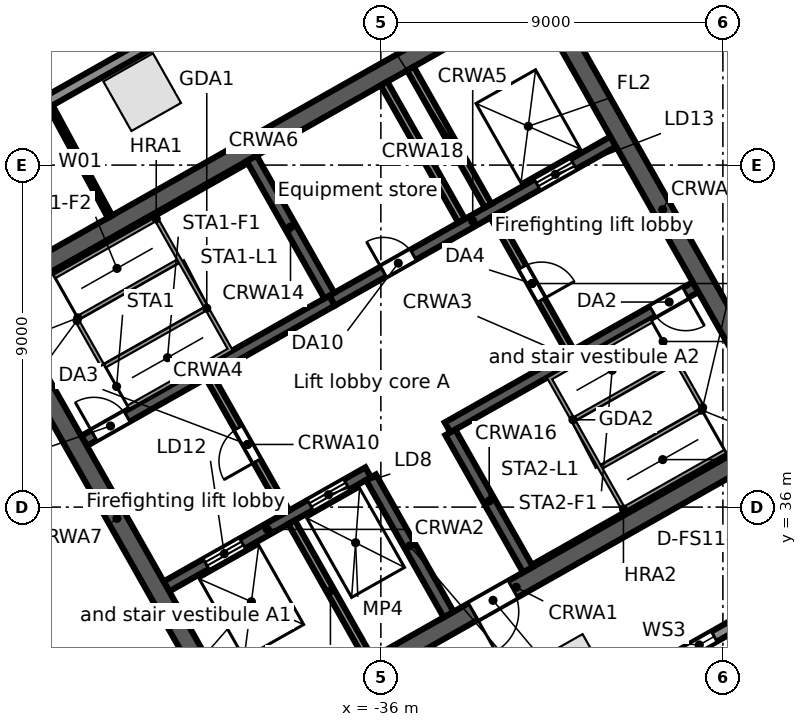
"""IFC4 building model, lengths in metres.
Left out: names, types, materials, properties, quantities, classifications, styles, units other than length and angle.
Written with IfcOpenShell. Run it as: python <this file> out.ifc"""

import sys

from ifc_helpers import new_model, si_unit, direction, frame, frame_2d, origin, origin_2d, place, context, subcontext, project, spatial, rectangle, extrude, element, fill, save


model = new_model("IFC4")
c1 = context("Model", 3, precision=1e-05, world=origin(), true_north=direction((0.0, 1.0)))
c2 = subcontext(c1, "Body", "Model", "MODEL_VIEW")
j1 = project(units=[si_unit("LENGTHUNIT", "METRE"), si_unit("PLANEANGLEUNIT", "RADIAN")], contexts=[c1])
p1 = place(None, origin())
s1 = spatial("IfcSite", under=j1, at=p1, CompositionType="ELEMENT")
p2 = place(p1, origin())
s2 = spatial("IfcBuilding", under=s1, at=p2, CompositionType="ELEMENT")
p3 = place(p2, frame((0.0, 0.0, 166.9)))
s3 = spatial("IfcBuildingStorey", under=s2, at=p3, CompositionType="ELEMENT", Elevation=166.9)
for number, where, z_axis, x_axis in (
    (1, (-42.28, 46.919, 0.0), (0.0, 0.0, 1.0), (-0.87, -0.492, 0.0)),
    (2, (-30.976, 31.635, 0.0), (0.0, 0.0, 1.0), (0.87, 0.492, 0.0)),
):
    element("IfcColumn", number, at=place(p3, frame(where, z_axis=z_axis, x_axis=x_axis)), inside=s3, PredefinedType="COLUMN", context=c2, shape_type="SweptSolid", body=[
        extrude(rectangle(XDim=1.5, YDim=1.5, at=origin_2d()), origin(), (0.0, 0.0, 1.0), 4.0),
    ])
p4 = place(p3, frame((-0.055, 47.969, 0.0), z_axis=(0.0, 0.0, 1.0), x_axis=(-0.870355730478, -0.492423499058, 0.0)))
e3 = element("IfcWall", 3, at=p4, inside=s3, PredefinedType="STANDARD", context=c2, shape_type="SweptSolid", body=[
    extrude(rectangle(XDim=43.75, YDim=0.3, at=frame_2d((21.875, 0.0))), origin(), (0.0, 0.0, 1.0), 3.68),
])
p5 = place(p4, frame((39.977, 0.0, 0.6)))
e4 = element("IfcOpeningElement", 4, at=p5, cuts=e3, PredefinedType="OPENING", context=c2, shape_type="SweptSolid", body=[
    extrude(rectangle(XDim=0.9, YDim=2.4, at=frame_2d((0.45, 1.2))), frame((0.0, 0.16, 0.0), z_axis=(0.0, -1.0, 0.0), x_axis=(1.0, 0.0, 0.0)), (0.0, 0.0, 1.0), 0.32),
])
p6 = place(p4, frame((37.338, 0.0, 0.0)))
e5 = element("IfcOpeningElement", 5, at=p6, cuts=e3, PredefinedType="OPENING", context=c2, shape_type="SweptSolid", body=[
    extrude(rectangle(XDim=1.8, YDim=2.4, at=frame_2d((0.9, 1.2))), frame((0.0, 0.16, 0.0), z_axis=(0.0, -1.0, 0.0), x_axis=(1.0, 0.0, 0.0)), (0.0, 0.0, 1.0), 0.32),
])
p7 = place(p4, frame((31.222, 0.0, 0.6)))
e6 = element("IfcOpeningElement", 6, at=p7, cuts=e3, PredefinedType="OPENING", context=c2, shape_type="SweptSolid", body=[
    extrude(rectangle(XDim=0.9, YDim=2.4, at=frame_2d((0.45, 1.2))), frame((0.0, 0.16, 0.0), z_axis=(0.0, -1.0, 0.0), x_axis=(1.0, 0.0, 0.0)), (0.0, 0.0, 1.0), 0.32),
])
p8 = place(p4, frame((28.584, 0.0, 0.0)))
e7 = element("IfcOpeningElement", 7, at=p8, cuts=e3, PredefinedType="OPENING", context=c2, shape_type="SweptSolid", body=[
    extrude(rectangle(XDim=1.8, YDim=2.4, at=frame_2d((0.9, 1.2))), frame((0.0, 0.16, 0.0), z_axis=(0.0, -1.0, 0.0), x_axis=(1.0, 0.0, 0.0)), (0.0, 0.0, 1.0), 0.32),
])
p9 = place(p4, frame((22.468, 0.0, 0.6)))
e8 = element("IfcOpeningElement", 8, at=p9, cuts=e3, PredefinedType="OPENING", context=c2, shape_type="SweptSolid", body=[
    extrude(rectangle(XDim=0.9, YDim=2.4, at=frame_2d((0.45, 1.2))), frame((0.0, 0.16, 0.0), z_axis=(0.0, -1.0, 0.0), x_axis=(1.0, 0.0, 0.0)), (0.0, 0.0, 1.0), 0.32),
])
p10 = place(p4, frame((19.829, 0.0, 0.0)))
e9 = element("IfcOpeningElement", 9, at=p10, cuts=e3, PredefinedType="OPENING", context=c2, shape_type="SweptSolid", body=[
    extrude(rectangle(XDim=1.8, YDim=2.4, at=frame_2d((0.9, 1.2))), frame((0.0, 0.16, 0.0), z_axis=(0.0, -1.0, 0.0), x_axis=(1.0, 0.0, 0.0)), (0.0, 0.0, 1.0), 0.32),
])
p11 = place(p4, frame((13.713, 0.0, 0.6)))
e10 = element("IfcOpeningElement", 10, at=p11, cuts=e3, PredefinedType="OPENING", context=c2, shape_type="SweptSolid", body=[
    extrude(rectangle(XDim=0.9, YDim=2.4, at=frame_2d((0.45, 1.2))), frame((0.0, 0.16, 0.0), z_axis=(0.0, -1.0, 0.0), x_axis=(1.0, 0.0, 0.0)), (0.0, 0.0, 1.0), 0.32),
])
p12 = place(p4, frame((11.075, 0.0, 0.0)))
e11 = element("IfcOpeningElement", 11, at=p12, cuts=e3, PredefinedType="OPENING", context=c2, shape_type="SweptSolid", body=[
    extrude(rectangle(XDim=1.8, YDim=2.4, at=frame_2d((0.9, 1.2))), frame((0.0, 0.16, 0.0), z_axis=(0.0, -1.0, 0.0), x_axis=(1.0, 0.0, 0.0)), (0.0, 0.0, 1.0), 0.32),
])
p13 = place(p4, frame((4.959, 0.0, 0.6)))
e12 = element("IfcOpeningElement", 12, at=p13, cuts=e3, PredefinedType="OPENING", context=c2, shape_type="SweptSolid", body=[
    extrude(rectangle(XDim=0.9, YDim=2.4, at=frame_2d((0.45, 1.2))), frame((0.0, 0.16, 0.0), z_axis=(0.0, -1.0, 0.0), x_axis=(1.0, 0.0, 0.0)), (0.0, 0.0, 1.0), 0.32),
])
p14 = place(p4, frame((2.32, 0.0, 0.0)))
e13 = element("IfcOpeningElement", 13, at=p14, cuts=e3, PredefinedType="OPENING", context=c2, shape_type="SweptSolid", body=[
    extrude(rectangle(XDim=1.8, YDim=2.4, at=frame_2d((0.9, 1.2))), frame((0.0, 0.16, 0.0), z_axis=(0.0, -1.0, 0.0), x_axis=(1.0, 0.0, 0.0)), (0.0, 0.0, 1.0), 0.32),
])
p15 = place(p3, frame((-58.745, 38.764, 0.0), z_axis=(0.0, 0.0, 1.0), x_axis=(0.870355811726, 0.492423355453, 0.0)))
e14 = element("IfcWall", 14, at=p15, inside=s3, PredefinedType="STANDARD", context=c2, shape_type="SweptSolid", body=[
    extrude(rectangle(XDim=64.025, YDim=0.3, at=frame_2d((32.013, 0.0))), origin(), (0.0, 0.0, 1.0), 3.68),
])
p16 = place(p15, frame((60.122, 0.0, 0.6)))
e15 = element("IfcOpeningElement", 15, at=p16, cuts=e14, PredefinedType="OPENING", context=c2, shape_type="SweptSolid", body=[
    extrude(rectangle(XDim=0.9, YDim=2.4, at=frame_2d((0.45, 1.2))), frame((0.0, 0.16, 0.0), z_axis=(0.0, -1.0, 0.0), x_axis=(1.0, 0.0, 0.0)), (0.0, 0.0, 1.0), 0.32),
])
p17 = place(p15, frame((50.992, 0.0, 0.6)))
e16 = element("IfcOpeningElement", 16, at=p17, cuts=e14, PredefinedType="OPENING", context=c2, shape_type="SweptSolid", body=[
    extrude(rectangle(XDim=0.9, YDim=2.4, at=frame_2d((0.45, 1.2))), frame((0.0, 0.16, 0.0), z_axis=(0.0, -1.0, 0.0), x_axis=(1.0, 0.0, 0.0)), (0.0, 0.0, 1.0), 0.32),
])
p18 = place(p15, frame((41.862, 0.0, 0.6)))
e17 = element("IfcOpeningElement", 17, at=p18, cuts=e14, PredefinedType="OPENING", context=c2, shape_type="SweptSolid", body=[
    extrude(rectangle(XDim=0.9, YDim=2.4, at=frame_2d((0.45, 1.2))), frame((0.0, 0.16, 0.0), z_axis=(0.0, -1.0, 0.0), x_axis=(1.0, 0.0, 0.0)), (0.0, 0.0, 1.0), 0.32),
])
p19 = place(p15, frame((32.732, 0.0, 0.6)))
e18 = element("IfcOpeningElement", 18, at=p19, cuts=e14, PredefinedType="OPENING", context=c2, shape_type="SweptSolid", body=[
    extrude(rectangle(XDim=0.9, YDim=2.4, at=frame_2d((0.45, 1.2))), frame((0.0, 0.16, 0.0), z_axis=(0.0, -1.0, 0.0), x_axis=(1.0, 0.0, 0.0)), (0.0, 0.0, 1.0), 0.32),
])
p20 = place(p15, frame((23.602, 0.0, 0.6)))
e19 = element("IfcOpeningElement", 19, at=p20, cuts=e14, PredefinedType="OPENING", context=c2, shape_type="SweptSolid", body=[
    extrude(rectangle(XDim=0.9, YDim=2.4, at=frame_2d((0.45, 1.2))), frame((0.0, 0.16, 0.0), z_axis=(0.0, -1.0, 0.0), x_axis=(1.0, 0.0, 0.0)), (0.0, 0.0, 1.0), 0.32),
])
p21 = place(p15, frame((14.472, 0.0, 0.6)))
e20 = element("IfcOpeningElement", 20, at=p21, cuts=e14, PredefinedType="OPENING", context=c2, shape_type="SweptSolid", body=[
    extrude(rectangle(XDim=0.9, YDim=2.4, at=frame_2d((0.45, 1.2))), frame((0.0, 0.16, 0.0), z_axis=(0.0, -1.0, 0.0), x_axis=(1.0, 0.0, 0.0)), (0.0, 0.0, 1.0), 0.32),
])
p22 = place(p15, frame((5.342, 0.0, 0.6)))
e21 = element("IfcOpeningElement", 21, at=p22, cuts=e14, PredefinedType="OPENING", context=c2, shape_type="SweptSolid", body=[
    extrude(rectangle(XDim=0.9, YDim=2.4, at=frame_2d((0.45, 1.2))), frame((0.0, 0.16, 0.0), z_axis=(0.0, -1.0, 0.0), x_axis=(1.0, 0.0, 0.0)), (0.0, 0.0, 1.0), 0.32),
])
p23 = place(p3, frame((-44.109, 26.504, 0.0), z_axis=(0.0, 0.0, 1.0), x_axis=(-0.857169502585, 0.515034410344, 0.0)))
e22 = element("IfcWall", 22, at=p23, inside=s3, PredefinedType="STANDARD", context=c2, shape_type="SweptSolid", body=[
    extrude(rectangle(XDim=17.127, YDim=0.3, at=frame_2d((8.563, 0.0))), origin(), (0.0, 0.0, 1.0), 3.68),
])
p24 = place(p23, frame((13.403, 0.0, 0.6)))
e23 = element("IfcOpeningElement", 23, at=p24, cuts=e22, PredefinedType="OPENING", context=c2, shape_type="SweptSolid", body=[
    extrude(rectangle(XDim=0.9, YDim=2.4, at=frame_2d((0.45, 1.2))), frame((0.0, 0.16, 0.0), z_axis=(0.0, -1.0, 0.0), x_axis=(1.0, 0.0, 0.0)), (0.0, 0.0, 1.0), 0.32),
])
p25 = place(p23, frame((4.903, 0.0, 0.6)))
e24 = element("IfcOpeningElement", 24, at=p25, cuts=e22, PredefinedType="OPENING", context=c2, shape_type="SweptSolid", body=[
    extrude(rectangle(XDim=0.9, YDim=2.4, at=frame_2d((0.45, 1.2))), frame((0.0, 0.16, 0.0), z_axis=(0.0, -1.0, 0.0), x_axis=(1.0, 0.0, 0.0)), (0.0, 0.0, 1.0), 0.32),
])
p26 = place(p3, frame((-39.838, 29.705, 0.0), z_axis=(0.0, 0.0, 1.0), x_axis=(0.870350116061, 0.492433422375, 0.0)))
e25 = element("IfcWall", 25, at=p26, inside=s3, PredefinedType="SOLIDWALL", context=c2, shape_type="SweptSolid", body=[
    extrude(rectangle(XDim=17.0, YDim=0.5, at=frame_2d((8.5, 0.0))), origin(), (0.0, 0.0, 1.0), 3.68),
])
p27 = place(p26, frame((7.2, 0.0, 0.0)))
e26 = element("IfcOpeningElement", 26, at=p27, cuts=e25, PredefinedType="OPENING", context=c2, shape_type="SweptSolid", body=[
    extrude(rectangle(XDim=1.2, YDim=2.1, at=frame_2d((0.6, 1.05))), frame((0.0, 0.26, 0.0), z_axis=(0.0, -1.0, 0.0), x_axis=(1.0, 0.0, 0.0)), (0.0, 0.0, 1.0), 0.52),
])
p28 = place(p3, frame((-41.643, 33.912, 0.0), z_axis=(0.0, 0.0, 1.0), x_axis=(0.870343599782, 0.492444939378, 0.0)))
e27 = element("IfcWall", 27, at=p28, inside=s3, PredefinedType="SOLIDWALL", context=c2, shape_type="SweptSolid", body=[
    extrude(rectangle(XDim=6.1, YDim=0.3, at=frame_2d((3.05, 0.0))), origin(), (0.0, 0.0, 1.0), 3.68),
])
p29 = place(p28, frame((1.2, 0.0, 0.0)))
e28 = element("IfcOpeningElement", 28, at=p29, cuts=e27, PredefinedType="OPENING", context=c2, shape_type="SweptSolid", body=[
    extrude(rectangle(XDim=1.1, YDim=2.1, at=frame_2d((0.55, 1.05))), frame((0.0, 0.16, 0.0), z_axis=(0.0, -1.0, 0.0), x_axis=(1.0, 0.0, 0.0)), (0.0, 0.0, 1.0), 0.32),
])
p30 = place(p28, frame((4.35, 0.0, 0.0)))
e29 = element("IfcOpeningElement", 29, at=p30, cuts=e27, PredefinedType="OPENING", context=c2, shape_type="SweptSolid", body=[
    extrude(rectangle(XDim=1.1, YDim=2.1, at=frame_2d((0.55, 1.05))), frame((0.0, 0.16, 0.0), z_axis=(0.0, -1.0, 0.0), x_axis=(1.0, 0.0, 0.0)), (0.0, 0.0, 1.0), 0.32),
])
p31 = place(p3, frame((-34.245, 38.097, 0.0), z_axis=(0.0, 0.0, 1.0), x_axis=(0.870364520461, 0.492407962489, 0.0)))
e30 = element("IfcWall", 30, at=p31, inside=s3, PredefinedType="SOLIDWALL", context=c2, shape_type="SweptSolid", body=[
    extrude(rectangle(XDim=7.5, YDim=0.3, at=frame_2d((3.75, 0.0))), origin(), (0.0, 0.0, 1.0), 3.68),
])
p32 = place(p31, frame((6.2, 0.0, 0.0)))
e31 = element("IfcOpeningElement", 31, at=p32, cuts=e30, PredefinedType="OPENING", context=c2, shape_type="SweptSolid", body=[
    extrude(rectangle(XDim=1.0, YDim=2.1, at=frame_2d((0.5, 1.05))), frame((0.0, 0.16, 0.0), z_axis=(0.0, -1.0, 0.0), x_axis=(1.0, 0.0, 0.0)), (0.0, 0.0, 1.0), 0.32),
])
p33 = place(p3, frame((-43.81, 37.741, 0.0), z_axis=(0.0, 0.0, 1.0), x_axis=(0.870350569555, 0.492432620848, 0.0)))
e32 = element("IfcWall", 32, at=p33, inside=s3, PredefinedType="SOLIDWALL", context=c2, shape_type="SweptSolid", body=[
    extrude(rectangle(XDim=7.5, YDim=0.3, at=frame_2d((3.75, 0.0))), origin(), (0.0, 0.0, 1.0), 3.68),
])
p34 = place(p33, frame((0.3, 0.0, 0.0)))
e33 = element("IfcOpeningElement", 33, at=p34, cuts=e32, PredefinedType="OPENING", context=c2, shape_type="SweptSolid", body=[
    extrude(rectangle(XDim=1.0, YDim=2.1, at=frame_2d((0.5, 1.05))), frame((0.0, 0.16, 0.0), z_axis=(0.0, -1.0, 0.0), x_axis=(1.0, 0.0, 0.0)), (0.0, 0.0, 1.0), 0.32),
])
p35 = place(p3, frame((-37.282, 41.435, 0.0), z_axis=(0.0, 0.0, 1.0), x_axis=(0.870356271124, 0.492422543467, 0.0)))
e34 = element("IfcWall", 34, at=p35, inside=s3, PredefinedType="SOLIDWALL", context=c2, shape_type="SweptSolid", body=[
    extrude(rectangle(XDim=8.5, YDim=0.3, at=frame_2d((4.25, 0.0))), origin(), (0.0, 0.0, 1.0), 3.68),
])
p36 = place(p35, frame((6.2, 0.0, 0.0)))
e35 = element("IfcOpeningElement", 35, at=p36, cuts=e34, PredefinedType="OPENING", context=c2, shape_type="SweptSolid", body=[
    extrude(rectangle(XDim=1.1, YDim=2.1, at=frame_2d((0.55, 1.05))), frame((0.0, 0.16, 0.0), z_axis=(0.0, -1.0, 0.0), x_axis=(1.0, 0.0, 0.0)), (0.0, 0.0, 1.0), 0.32),
])
p37 = place(p35, frame((1.55, 0.0, 0.0)))
e36 = element("IfcOpeningElement", 36, at=p37, cuts=e34, PredefinedType="OPENING", context=c2, shape_type="SweptSolid", body=[
    extrude(rectangle(XDim=0.9, YDim=2.1, at=frame_2d((0.45, 1.05))), frame((0.0, 0.16, 0.0), z_axis=(0.0, -1.0, 0.0), x_axis=(1.0, 0.0, 0.0)), (0.0, 0.0, 1.0), 0.32),
])
p38 = place(p3, frame((-46.486, 41.455, 0.0), z_axis=(0.0, 0.0, 1.0), x_axis=(0.870353598469, 0.492427267353, 0.0)))
e37 = element("IfcWall", 37, at=p38, inside=s3, PredefinedType="SOLIDWALL", context=c2, shape_type="SweptSolid", body=[
    extrude(rectangle(XDim=17.0, YDim=0.5, at=frame_2d((8.5, 0.0))), origin(), (0.0, 0.0, 1.0), 3.68),
])
p39 = place(p3, frame((-46.145, 41.361, 0.0), z_axis=(0.0, 0.0, 1.0), x_axis=(0.492435316254, -0.870349044525, 0.0)))
e38 = element("IfcWall", 38, at=p39, inside=s3, PredefinedType="SOLIDWALL", context=c2, shape_type="SweptSolid", body=[
    extrude(rectangle(XDim=13.0, YDim=0.5, at=frame_2d((6.5, 0.0))), origin(), (0.0, 0.0, 1.0), 3.68),
])
p40 = place(p3, frame((-38.349, 35.603, 0.0), z_axis=(0.0, 0.0, 1.0), x_axis=(0.492396453737, -0.870371031427, 0.0)))
e39 = element("IfcWall", 39, at=p40, inside=s3, PredefinedType="SOLIDWALL", context=c2, shape_type="SweptSolid", body=[
    extrude(rectangle(XDim=4.15, YDim=0.2, at=frame_2d((2.075, 0.0))), origin(), (0.0, 0.0, 1.0), 3.68),
])
p41 = place(p3, frame((-40.516, 39.433, 0.0), z_axis=(0.0, 0.0, 1.0), x_axis=(0.492453559952, -0.87033872216, 0.0)))
e40 = element("IfcWall", 40, at=p41, inside=s3, PredefinedType="PARTITIONING", context=c2, shape_type="SweptSolid", body=[
    extrude(rectangle(XDim=4.1, YDim=0.2, at=frame_2d((2.05, 0.0))), origin(), (0.0, 0.0, 1.0), 3.68),
])
p42 = place(p41, frame((1.55, 0.0, 0.0)))
e41 = element("IfcOpeningElement", 41, at=p42, cuts=e40, PredefinedType="OPENING", context=c2, shape_type="SweptSolid", body=[
    extrude(rectangle(XDim=1.0, YDim=2.1, at=frame_2d((0.5, 1.05))), frame((0.0, 0.11, 0.0), z_axis=(0.0, -1.0, 0.0), x_axis=(1.0, 0.0, 0.0)), (0.0, 0.0, 1.0), 0.22),
])
for number, where, z_axis, x_axis in (
    (42, (-36.26, 36.785, 0.0), (0.0, 0.0, 1.0), (0.492, -0.87, 0.0)),
    (43, (-39.399, 45.177, 0.0), (0.0, 0.0, 1.0), (0.492, -0.87, 0.0)),
    (44, (-34.171, 37.967, 0.0), (0.0, 0.0, 1.0), (0.492, -0.87, 0.0)),
):
    element("IfcWall", number, at=place(p3, frame(where, z_axis=z_axis, x_axis=x_axis)), inside=s3, PredefinedType="SOLIDWALL", context=c2, shape_type="SweptSolid", body=[
        extrude(rectangle(XDim=4.15, YDim=0.3, at=frame_2d((2.075, 0.0))), origin(), (0.0, 0.0, 1.0), 3.68),
    ])
p43 = place(p3, frame((-35.918, 47.147, 0.0), z_axis=(0.0, 0.0, 1.0), x_axis=(0.492441017253, -0.870345818929, 0.0)))
e45 = element("IfcWall", 45, at=p43, inside=s3, PredefinedType="SOLIDWALL", context=c2, shape_type="SweptSolid", body=[
    extrude(rectangle(XDim=4.15, YDim=0.2, at=frame_2d((2.075, 0.0))), origin(), (0.0, 0.0, 1.0), 3.68),
])
p44 = place(p3, frame((-33.031, 43.667, 0.0), z_axis=(0.0, 0.0, 1.0), x_axis=(0.492408451753, -0.87036424366, 0.0)))
e46 = element("IfcWall", 46, at=p44, inside=s3, PredefinedType="PARTITIONING", context=c2, shape_type="SweptSolid", body=[
    extrude(rectangle(XDim=4.1, YDim=0.2, at=frame_2d((2.05, 0.0))), origin(), (0.0, 0.0, 1.0), 3.68),
])
p45 = place(p44, frame((1.55, 0.0, 0.0)))
e47 = element("IfcOpeningElement", 47, at=p45, cuts=e46, PredefinedType="OPENING", context=c2, shape_type="SweptSolid", body=[
    extrude(rectangle(XDim=1.0, YDim=2.1, at=frame_2d((0.5, 1.05))), frame((0.0, 0.11, 0.0), z_axis=(0.0, -1.0, 0.0), x_axis=(1.0, 0.0, 0.0)), (0.0, 0.0, 1.0), 0.22),
])
p46 = place(p3, frame((-35.222, 47.541, 0.0), z_axis=(0.0, 0.0, 1.0), x_axis=(0.492421666909, -0.870356767055, 0.0)))
e48 = element("IfcWall", 48, at=p46, inside=s3, PredefinedType="SOLIDWALL", context=c2, shape_type="SweptSolid", body=[
    extrude(rectangle(XDim=4.15, YDim=0.2, at=frame_2d((2.075, 0.0))), origin(), (0.0, 0.0, 1.0), 3.68),
])
p47 = place(p3, frame((-31.784, 49.486, 0.0), z_axis=(0.0, 0.0, 1.0), x_axis=(0.492435316254, -0.870349044525, 0.0)))
e49 = element("IfcWall", 49, at=p47, inside=s3, PredefinedType="SOLIDWALL", context=c2, shape_type="SweptSolid", body=[
    extrude(rectangle(XDim=13.0, YDim=0.5, at=frame_2d((6.5, 0.0))), origin(), (0.0, 0.0, 1.0), 3.68),
])
p48 = place(p3, frame((-44.693, 46.542, 0.0), z_axis=(0.0, 0.0, 1.0), x_axis=(0.475199384016, -0.879878142376, 0.0)))
e50 = element("IfcWall", 50, at=p48, inside=s3, PredefinedType="PARTITIONING", context=c2, shape_type="SweptSolid", body=[
    extrude(rectangle(XDim=3.296, YDim=0.125, at=frame_2d((1.648, 0.0))), origin(), (0.0, 0.0, 1.0), 2.96),
])
p49 = place(p7, origin())
e51 = element("IfcWindow", 51, at=p49, inside=s3, PartitioningType="SINGLE_PANEL", PredefinedType="WINDOW", context=c2, shape_type="SweptSolid", body=[
    extrude(rectangle(XDim=0.9, YDim=2.4, at=frame_2d((0.45, 1.2))), frame((0.0, 0.03, 0.0), z_axis=(0.0, -1.0, 0.0), x_axis=(1.0, 0.0, 0.0)), (0.0, 0.0, 1.0), 0.06),
])
fill(e6, e51)
p50 = place(p36, origin())
e52 = element("IfcDoor", 52, at=p50, inside=s3, OperationType="DOUBLE_DOOR_SLIDING", PredefinedType="DOOR", context=c2, shape_type="SweptSolid", body=[
    extrude(rectangle(XDim=1.1, YDim=2.1, at=frame_2d((0.55, 1.05))), frame((0.0, 0.025, 0.0), z_axis=(0.0, -1.0, 0.0), x_axis=(1.0, 0.0, 0.0)), (0.0, 0.0, 1.0), 0.05),
])
fill(e35, e52)
p51 = place(p29, origin())
e53 = element("IfcDoor", 53, at=p51, inside=s3, OperationType="DOUBLE_DOOR_SLIDING", PredefinedType="DOOR", context=c2, shape_type="SweptSolid", body=[
    extrude(rectangle(XDim=1.1, YDim=2.1, at=frame_2d((0.55, 1.05))), frame((0.0, 0.025, 0.0), z_axis=(0.0, -1.0, 0.0), x_axis=(1.0, 0.0, 0.0)), (0.0, 0.0, 1.0), 0.05),
])
fill(e28, e53)
p52 = place(p30, origin())
e54 = element("IfcDoor", 54, at=p52, inside=s3, OperationType="DOUBLE_DOOR_SLIDING", PredefinedType="DOOR", context=c2, shape_type="SweptSolid", body=[
    extrude(rectangle(XDim=1.1, YDim=2.1, at=frame_2d((0.55, 1.05))), frame((0.0, 0.025, 0.0), z_axis=(0.0, -1.0, 0.0), x_axis=(1.0, 0.0, 0.0)), (0.0, 0.0, 1.0), 0.05),
])
fill(e29, e54)
p53 = place(p34, origin())
e55 = element("IfcDoor", 55, at=p53, inside=s3, OperationType="SINGLE_SWING_LEFT", PredefinedType="DOOR", context=c2, shape_type="SweptSolid", body=[
    extrude(rectangle(XDim=1.0, YDim=2.1, at=frame_2d((0.5, 1.05))), frame((0.0, 0.025, 0.0), z_axis=(0.0, -1.0, 0.0), x_axis=(1.0, 0.0, 0.0)), (0.0, 0.0, 1.0), 0.05),
])
fill(e33, e55)
p54 = place(p32, frame((1.0, 0.0, 0.0), z_axis=(0.0, 0.0, 1.0), x_axis=(-1.0, 0.0, 0.0)))
e56 = element("IfcDoor", 56, at=p54, inside=s3, OperationType="SINGLE_SWING_LEFT", PredefinedType="DOOR", context=c2, shape_type="SweptSolid", body=[
    extrude(rectangle(XDim=1.0, YDim=2.1, at=frame_2d((0.5, 1.05))), frame((0.0, 0.025, 0.0), z_axis=(0.0, -1.0, 0.0), x_axis=(1.0, 0.0, 0.0)), (0.0, 0.0, 1.0), 0.05),
])
fill(e31, e56)
p55 = place(p42, frame((1.0, 0.0, 0.0), z_axis=(0.0, 0.0, 1.0), x_axis=(-1.0, 0.0, 0.0)))
e57 = element("IfcDoor", 57, at=p55, inside=s3, OperationType="SINGLE_SWING_LEFT", PredefinedType="DOOR", context=c2, shape_type="SweptSolid", body=[
    extrude(rectangle(XDim=1.0, YDim=2.1, at=frame_2d((0.5, 1.05))), frame((0.0, 0.025, 0.0), z_axis=(0.0, -1.0, 0.0), x_axis=(1.0, 0.0, 0.0)), (0.0, 0.0, 1.0), 0.05),
])
fill(e41, e57)
p56 = place(p45, origin())
e58 = element("IfcDoor", 58, at=p56, inside=s3, OperationType="SINGLE_SWING_RIGHT", PredefinedType="DOOR", context=c2, shape_type="SweptSolid", body=[
    extrude(rectangle(XDim=1.0, YDim=2.1, at=frame_2d((0.5, 1.05))), frame((0.0, 0.025, 0.0), z_axis=(0.0, -1.0, 0.0), x_axis=(1.0, 0.0, 0.0)), (0.0, 0.0, 1.0), 0.05),
])
fill(e47, e58)
p57 = place(p27, frame((1.2, 0.0, 0.0), z_axis=(0.0, 0.0, 1.0), x_axis=(-1.0, 0.0, 0.0)))
e59 = element("IfcDoor", 59, at=p57, inside=s3, OperationType="SINGLE_SWING_RIGHT", PredefinedType="DOOR", context=c2, shape_type="SweptSolid", body=[
    extrude(rectangle(XDim=1.2, YDim=2.1, at=frame_2d((0.6, 1.05))), frame((0.0, 0.025, 0.0), z_axis=(0.0, -1.0, 0.0), x_axis=(1.0, 0.0, 0.0)), (0.0, 0.0, 1.0), 0.05),
])
fill(e26, e59)
p58 = place(p37, origin())
e60 = element("IfcDoor", 60, at=p58, inside=s3, OperationType="SINGLE_SWING_LEFT", PredefinedType="DOOR", context=c2, shape_type="SweptSolid", body=[
    extrude(rectangle(XDim=0.9, YDim=2.1, at=frame_2d((0.45, 1.05))), frame((0.0, 0.025, 0.0), z_axis=(0.0, -1.0, 0.0), x_axis=(1.0, 0.0, 0.0)), (0.0, 0.0, 1.0), 0.05),
])
fill(e36, e60)
save(model, sys.argv[1])
